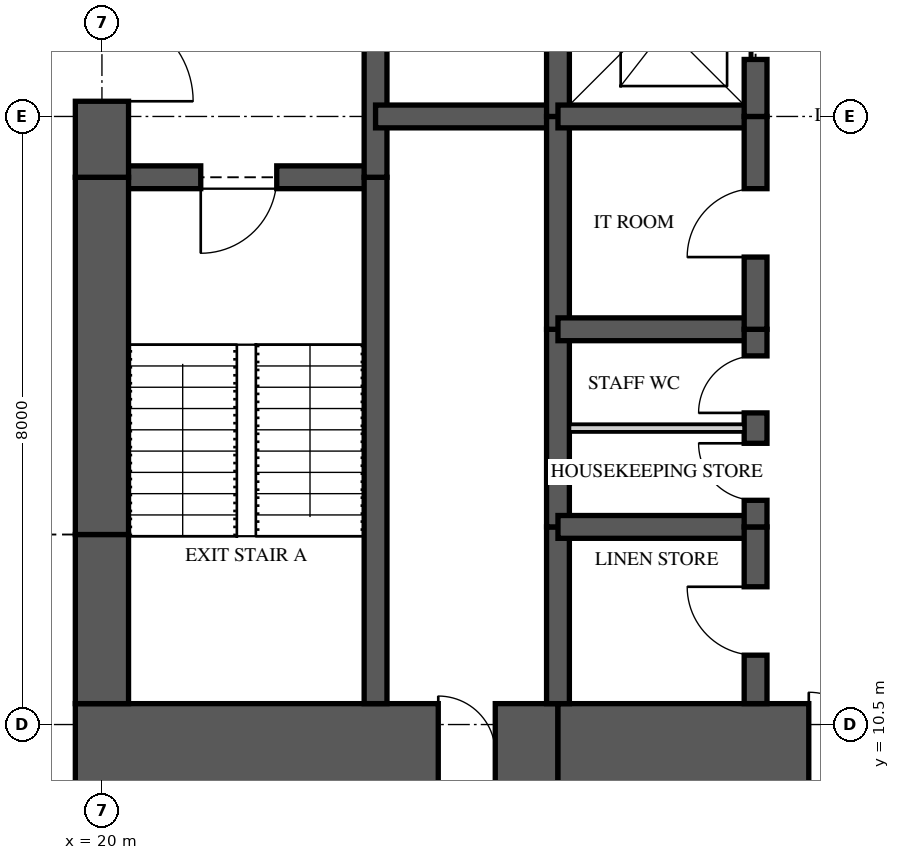
"""IFC4 building model, lengths in metres.
Left out: names, types, materials, properties, quantities, classifications, styles, units other than length and angle.
Written with IfcOpenShell. Run it as: python <this file> out.ifc"""

import sys

from ifc_helpers import new_model, si_unit, direction, frame, frame_2d, origin, place, context, subcontext, project, spatial, rectangle, extrude, element, fill, save


model = new_model("IFC4")
c1 = context("Model", 3, precision=1e-05, world=origin(), true_north=direction((0.0, 1.0)))
c2 = subcontext(c1, "Body", "Model", "MODEL_VIEW")
j1 = project(units=[si_unit("LENGTHUNIT", "METRE"), si_unit("PLANEANGLEUNIT", "RADIAN")], contexts=[c1])
p1 = place(None, origin())
s1 = spatial("IfcSite", under=j1, at=p1, CompositionType="ELEMENT")
p2 = place(p1, origin())
s2 = spatial("IfcBuilding", under=s1, at=p2, CompositionType="ELEMENT")
p3 = place(p2, frame((0.0, 0.0, 201.25)))
s3 = spatial("IfcBuildingStorey", under=s2, at=p3, CompositionType="ELEMENT", Elevation=201.25)
p4 = place(p3, frame((19.65, 10.125, 0.0), z_axis=(0.0, 0.0, 1.0), x_axis=(1.0, 0.0, 0.0)))
e1 = element("IfcWall", 1, at=p4, inside=s3, PredefinedType="SHEAR", context=c2, shape_type="SweptSolid", body=[
    extrude(rectangle(XDim=6.35, YDim=1.3, at=frame_2d((3.175, 0.0))), origin(), (0.0, 0.0, 1.0), 3.35),
])
p5 = place(p4, frame((4.775, 0.0, 0.0)))
e2 = element("IfcOpeningElement", 2, at=p5, cuts=e1, PredefinedType="OPENING", context=c2, shape_type="SweptSolid", body=[
    extrude(rectangle(XDim=0.75, YDim=2.1, at=frame_2d((0.375, 1.05))), frame((0.0, 0.66, 0.0), z_axis=(0.0, -1.0, 0.0), x_axis=(1.0, 0.0, 0.0)), (0.0, 0.0, 1.0), 1.32),
])
p6 = place(p3, frame((26.0, 10.125, 0.0), z_axis=(0.0, 0.0, 1.0), x_axis=(1.0, 0.0, 0.0)))
e3 = element("IfcWall", 3, at=p6, inside=s3, PredefinedType="SHEAR", context=c2, shape_type="SweptSolid", body=[
    extrude(rectangle(XDim=5.6, YDim=1.3, at=frame_2d((2.8, 0.0))), origin(), (0.0, 0.0, 1.0), 3.35),
])
p7 = place(p6, frame((3.3, 0.0, 0.0)))
e4 = element("IfcOpeningElement", 4, at=p7, cuts=e3, PredefinedType="OPENING", context=c2, shape_type="SweptSolid", body=[
    extrude(rectangle(XDim=1.6, YDim=2.1, at=frame_2d((0.8, 1.05))), frame((0.0, 0.66, 0.0), z_axis=(0.0, -1.0, 0.0), x_axis=(1.0, 0.0, 0.0)), (0.0, 0.0, 1.0), 1.32),
])
p8 = place(p3, frame((20.0, 23.3, 0.0), z_axis=(0.0, 0.0, 1.0), x_axis=(0.0, -1.0, 0.0)))
e5 = element("IfcWall", 5, at=p8, inside=s3, PredefinedType="SHEAR", context=c2, shape_type="SweptSolid", body=[
    extrude(rectangle(XDim=5.6, YDim=0.7, at=frame_2d((2.8, 0.0))), origin(), (0.0, 0.0, 1.0), 3.35),
])
p9 = place(p8, frame((3.4, 0.0, 0.0)))
e6 = element("IfcOpeningElement", 6, at=p9, cuts=e5, PredefinedType="OPENING", context=c2, shape_type="SweptSolid", body=[
    extrude(rectangle(XDim=1.2, YDim=2.2, at=frame_2d((0.6, 1.1))), frame((0.0, 0.36, 0.0), z_axis=(0.0, -1.0, 0.0), x_axis=(1.0, 0.0, 0.0)), (0.0, 0.0, 1.0), 0.72),
])
p10 = place(p3, frame((20.0, 17.7, 0.0), z_axis=(0.0, 0.0, 1.0), x_axis=(0.0, -1.0, 0.0)))
e7 = element("IfcWall", 7, at=p10, inside=s3, PredefinedType="SHEAR", context=c2, shape_type="SweptSolid", body=[
    extrude(rectangle(XDim=4.7, YDim=0.7, at=frame_2d((2.35, 0.0))), origin(), (0.0, 0.0, 1.0), 3.35),
])
p11 = place(p3, frame((20.0, 13.0, 0.0), z_axis=(0.0, 0.0, 1.0), x_axis=(0.0, -1.0, 0.0)))
e8 = element("IfcWall", 8, at=p11, inside=s3, PredefinedType="SHEAR", context=c2, shape_type="SweptSolid", body=[
    extrude(rectangle(XDim=2.225, YDim=0.7, at=frame_2d((1.113, 0.0))), origin(), (0.0, 0.0, 1.0), 3.35),
])
p12 = place(p3, frame((23.6, 10.775, 0.0), z_axis=(0.0, 0.0, 1.0), x_axis=(0.0, 1.0, 0.0)))
e9 = element("IfcWall", 9, at=p12, inside=s3, PredefinedType="SHEAR", context=c2, shape_type="SweptSolid", body=[
    extrude(rectangle(XDim=6.925, YDim=0.3, at=frame_2d((3.462, 0.0))), origin(), (0.0, 0.0, 1.0), 3.35),
])
p13 = place(p3, frame((23.6, 17.7, 0.0), z_axis=(0.0, 0.0, 1.0), x_axis=(0.0, 1.0, 0.0)))
e10 = element("IfcWall", 10, at=p13, inside=s3, PredefinedType="SHEAR", context=c2, shape_type="SweptSolid", body=[
    extrude(rectangle(XDim=5.6, YDim=0.3, at=frame_2d((2.8, 0.0))), origin(), (0.0, 0.0, 1.0), 3.35),
])
p14 = place(p3, frame((26.0, 10.775, 0.0), z_axis=(0.0, 0.0, 1.0), x_axis=(0.0, 1.0, 0.0)))
e11 = element("IfcWall", 11, at=p14, inside=s3, PredefinedType="SHEAR", context=c2, shape_type="SweptSolid", body=[
    extrude(rectangle(XDim=2.325, YDim=0.3, at=frame_2d((1.163, 0.0))), origin(), (0.0, 0.0, 1.0), 3.35),
])
p15 = place(p3, frame((26.0, 13.1, 0.0), z_axis=(0.0, 0.0, 1.0), x_axis=(0.0, 1.0, 0.0)))
e12 = element("IfcWall", 12, at=p15, inside=s3, PredefinedType="SHEAR", context=c2, shape_type="SweptSolid", body=[
    extrude(rectangle(XDim=2.6, YDim=0.3, at=frame_2d((1.3, 0.0))), origin(), (0.0, 0.0, 1.0), 3.35),
])
p16 = place(p3, frame((26.0, 15.7, 0.0), z_axis=(0.0, 0.0, 1.0), x_axis=(0.0, 1.0, 0.0)))
e13 = element("IfcWall", 13, at=p16, inside=s3, PredefinedType="SHEAR", context=c2, shape_type="SweptSolid", body=[
    extrude(rectangle(XDim=2.8, YDim=0.3, at=frame_2d((1.4, 0.0))), origin(), (0.0, 0.0, 1.0), 3.35),
])
p17 = place(p3, frame((26.0, 18.5, 0.0), z_axis=(0.0, 0.0, 1.0), x_axis=(0.0, 1.0, 0.0)))
e14 = element("IfcWall", 14, at=p17, inside=s3, PredefinedType="SHEAR", context=c2, shape_type="SweptSolid", body=[
    extrude(rectangle(XDim=2.6, YDim=0.3, at=frame_2d((1.3, 0.0))), origin(), (0.0, 0.0, 1.0), 3.35),
])
p18 = place(p3, frame((28.6, 10.775, 0.0), z_axis=(0.0, 0.0, 1.0), x_axis=(0.0, 1.0, 0.0)))
e15 = element("IfcWall", 15, at=p18, inside=s3, PredefinedType="SHEAR", context=c2, shape_type="SweptSolid", body=[
    extrude(rectangle(XDim=2.325, YDim=0.3, at=frame_2d((1.163, 0.0))), origin(), (0.0, 0.0, 1.0), 3.35),
])
p19 = place(p18, frame((0.637, 0.0, 0.0)))
e16 = element("IfcOpeningElement", 16, at=p19, cuts=e15, PredefinedType="OPENING", context=c2, shape_type="SweptSolid", body=[
    extrude(rectangle(XDim=0.9, YDim=2.1, at=frame_2d((0.45, 1.05))), frame((0.0, 0.16, 0.0), z_axis=(0.0, -1.0, 0.0), x_axis=(1.0, 0.0, 0.0)), (0.0, 0.0, 1.0), 0.32),
])
p20 = place(p3, frame((28.6, 13.1, 0.0), z_axis=(0.0, 0.0, 1.0), x_axis=(0.0, 1.0, 0.0)))
e17 = element("IfcWall", 17, at=p20, inside=s3, PredefinedType="SHEAR", context=c2, shape_type="SweptSolid", body=[
    extrude(rectangle(XDim=2.6, YDim=0.3, at=frame_2d((1.3, 0.0))), origin(), (0.0, 0.0, 1.0), 3.35),
])
p21 = place(p20, frame((0.35, 0.0, 0.0)))
e18 = element("IfcOpeningElement", 18, at=p21, cuts=e17, PredefinedType="OPENING", context=c2, shape_type="SweptSolid", body=[
    extrude(rectangle(XDim=0.75, YDim=2.1, at=frame_2d((0.375, 1.05))), frame((0.0, 0.16, 0.0), z_axis=(0.0, -1.0, 0.0), x_axis=(1.0, 0.0, 0.0)), (0.0, 0.0, 1.0), 0.32),
])
p22 = place(p20, frame((1.5, 0.0, 0.0)))
e19 = element("IfcOpeningElement", 19, at=p22, cuts=e17, PredefinedType="OPENING", context=c2, shape_type="SweptSolid", body=[
    extrude(rectangle(XDim=0.75, YDim=2.1, at=frame_2d((0.375, 1.05))), frame((0.0, 0.16, 0.0), z_axis=(0.0, -1.0, 0.0), x_axis=(1.0, 0.0, 0.0)), (0.0, 0.0, 1.0), 0.32),
])
p23 = place(p3, frame((28.6, 15.7, 0.0), z_axis=(0.0, 0.0, 1.0), x_axis=(0.0, 1.0, 0.0)))
e20 = element("IfcWall", 20, at=p23, inside=s3, PredefinedType="SHEAR", context=c2, shape_type="SweptSolid", body=[
    extrude(rectangle(XDim=2.8, YDim=0.3, at=frame_2d((1.4, 0.0))), origin(), (0.0, 0.0, 1.0), 3.35),
])
p24 = place(p23, frame((0.95, 0.0, 0.0)))
e21 = element("IfcOpeningElement", 21, at=p24, cuts=e20, PredefinedType="OPENING", context=c2, shape_type="SweptSolid", body=[
    extrude(rectangle(XDim=0.9, YDim=2.1, at=frame_2d((0.45, 1.05))), frame((0.0, 0.16, 0.0), z_axis=(0.0, -1.0, 0.0), x_axis=(1.0, 0.0, 0.0)), (0.0, 0.0, 1.0), 0.32),
])
p25 = place(p3, frame((28.6, 18.5, 0.0), z_axis=(0.0, 0.0, 1.0), x_axis=(0.0, 1.0, 0.0)))
e22 = element("IfcWall", 22, at=p25, inside=s3, PredefinedType="SHEAR", context=c2, shape_type="SweptSolid", body=[
    extrude(rectangle(XDim=2.6, YDim=0.3, at=frame_2d((1.3, 0.0))), origin(), (0.0, 0.0, 1.0), 3.35),
])
p26 = place(p25, frame((0.75, 0.0, 0.0)))
e23 = element("IfcOpeningElement", 23, at=p26, cuts=e22, PredefinedType="OPENING", context=c2, shape_type="SweptSolid", body=[
    extrude(rectangle(XDim=1.1, YDim=2.1, at=frame_2d((0.55, 1.05))), frame((0.0, 0.16, 0.0), z_axis=(0.0, -1.0, 0.0), x_axis=(1.0, 0.0, 0.0)), (0.0, 0.0, 1.0), 0.32),
])
p27 = place(p3, frame((20.0, 17.7, 0.0), z_axis=(0.0, 0.0, 1.0), x_axis=(1.0, 0.0, 0.0)))
e24 = element("IfcWall", 24, at=p27, inside=s3, PredefinedType="SHEAR", context=c2, shape_type="SweptSolid", body=[
    extrude(rectangle(XDim=3.6, YDim=0.3, at=frame_2d((1.8, 0.0))), origin(), (0.0, 0.0, 1.0), 3.35),
])
p28 = place(p27, frame((1.3, 0.0, 0.0)))
e25 = element("IfcOpeningElement", 25, at=p28, cuts=e24, PredefinedType="OPENING", context=c2, shape_type="SweptSolid", body=[
    extrude(rectangle(XDim=1.0, YDim=2.1, at=frame_2d((0.5, 1.05))), frame((0.0, 0.16, 0.0), z_axis=(0.0, -1.0, 0.0), x_axis=(1.0, 0.0, 0.0)), (0.0, 0.0, 1.0), 0.32),
])
p29 = place(p3, frame((23.6, 18.5, 0.0), z_axis=(0.0, 0.0, 1.0), x_axis=(1.0, 0.0, 0.0)))
e26 = element("IfcWall", 26, at=p29, inside=s3, PredefinedType="SHEAR", context=c2, shape_type="SweptSolid", body=[
    extrude(rectangle(XDim=2.4, YDim=0.3, at=frame_2d((1.2, 0.0))), origin(), (0.0, 0.0, 1.0), 3.35),
])
for number, where, z_axis, x_axis in (
    (27, (26.0, 13.1, 0.0), (0.0, 0.0, 1.0), (1.0, 0.0, 0.0)),
    (28, (26.0, 15.7, 0.0), (0.0, 0.0, 1.0), (1.0, 0.0, 0.0)),
    (29, (26.0, 18.5, 0.0), (0.0, 0.0, 1.0), (1.0, 0.0, 0.0)),
):
    element("IfcWall", number, at=place(p3, frame(where, z_axis=z_axis, x_axis=x_axis)), inside=s3, PredefinedType="SHEAR", context=c2, shape_type="SweptSolid", body=[
        extrude(rectangle(XDim=2.6, YDim=0.3, at=frame_2d((1.3, 0.0))), origin(), (0.0, 0.0, 1.0), 3.35),
    ])
p30 = place(p3, frame((26.15, 14.4, 0.0), z_axis=(0.0, 0.0, 1.0), x_axis=(1.0, 0.0, 0.0)))
e30 = element("IfcWall", 30, at=p30, inside=s3, PredefinedType="PARTITIONING", context=c2, shape_type="SweptSolid", body=[
    extrude(rectangle(XDim=2.3, YDim=0.1, at=frame_2d((1.15, 0.0))), origin(), (0.0, 0.0, 1.0), 3.11),
])
p31 = place(p28, frame((1.0, 0.0, 0.0), z_axis=(0.0, 0.0, 1.0), x_axis=(-1.0, 0.0, 0.0)))
e31 = element("IfcDoor", 31, at=p31, inside=s3, OperationType="SINGLE_SWING_RIGHT", PredefinedType="DOOR", context=c2, shape_type="SweptSolid", body=[
    extrude(rectangle(XDim=1.0, YDim=2.1, at=frame_2d((0.5, 1.05))), frame((0.0, 0.025, 0.0), z_axis=(0.0, -1.0, 0.0), x_axis=(1.0, 0.0, 0.0)), (0.0, 0.0, 1.0), 0.05),
])
fill(e25, e31)
p32 = place(p9, origin())
e32 = element("IfcDoor", 32, at=p32, inside=s3, OperationType="SINGLE_SWING_RIGHT", PredefinedType="DOOR", context=c2, shape_type="SweptSolid", body=[
    extrude(rectangle(XDim=1.2, YDim=2.2, at=frame_2d((0.6, 1.1))), frame((0.0, 0.025, 0.0), z_axis=(0.0, -1.0, 0.0), x_axis=(1.0, 0.0, 0.0)), (0.0, 0.0, 1.0), 0.05),
])
fill(e6, e32)
p33 = place(p26, origin())
e33 = element("IfcDoor", 33, at=p33, inside=s3, OperationType="SLIDING_TO_LEFT", PredefinedType="DOOR", context=c2, shape_type="SweptSolid", body=[
    extrude(rectangle(XDim=1.1, YDim=2.1, at=frame_2d((0.55, 1.05))), frame((0.0, 0.025, 0.0), z_axis=(0.0, -1.0, 0.0), x_axis=(1.0, 0.0, 0.0)), (0.0, 0.0, 1.0), 0.05),
])
fill(e23, e33)
p34 = place(p19, origin())
e34 = element("IfcDoor", 34, at=p34, inside=s3, OperationType="SINGLE_SWING_RIGHT", PredefinedType="DOOR", context=c2, shape_type="SweptSolid", body=[
    extrude(rectangle(XDim=0.9, YDim=2.1, at=frame_2d((0.45, 1.05))), frame((0.0, 0.025, 0.0), z_axis=(0.0, -1.0, 0.0), x_axis=(1.0, 0.0, 0.0)), (0.0, 0.0, 1.0), 0.05),
])
fill(e16, e34)
p35 = place(p21, origin())
e35 = element("IfcDoor", 35, at=p35, inside=s3, OperationType="SINGLE_SWING_RIGHT", PredefinedType="DOOR", context=c2, shape_type="SweptSolid", body=[
    extrude(rectangle(XDim=0.75, YDim=2.1, at=frame_2d((0.375, 1.05))), frame((0.0, 0.025, 0.0), z_axis=(0.0, -1.0, 0.0), x_axis=(1.0, 0.0, 0.0)), (0.0, 0.0, 1.0), 0.05),
])
fill(e18, e35)
p36 = place(p22, origin())
e36 = element("IfcDoor", 36, at=p36, inside=s3, OperationType="SINGLE_SWING_LEFT", PredefinedType="DOOR", context=c2, shape_type="SweptSolid", body=[
    extrude(rectangle(XDim=0.75, YDim=2.1, at=frame_2d((0.375, 1.05))), frame((0.0, 0.025, 0.0), z_axis=(0.0, -1.0, 0.0), x_axis=(1.0, 0.0, 0.0)), (0.0, 0.0, 1.0), 0.05),
])
fill(e19, e36)
p37 = place(p24, origin())
e37 = element("IfcDoor", 37, at=p37, inside=s3, OperationType="SINGLE_SWING_LEFT", PredefinedType="DOOR", context=c2, shape_type="SweptSolid", body=[
    extrude(rectangle(XDim=0.9, YDim=2.1, at=frame_2d((0.45, 1.05))), frame((0.0, 0.025, 0.0), z_axis=(0.0, -1.0, 0.0), x_axis=(1.0, 0.0, 0.0)), (0.0, 0.0, 1.0), 0.05),
])
fill(e21, e37)
p38 = place(p7, origin())
e38 = element("IfcDoor", 38, at=p38, inside=s3, OperationType="DOUBLE_DOOR_SINGLE_SWING", PredefinedType="DOOR", context=c2, shape_type="SweptSolid", body=[
    extrude(rectangle(XDim=1.6, YDim=2.1, at=frame_2d((0.8, 1.05))), frame((0.0, 0.025, 0.0), z_axis=(0.0, -1.0, 0.0), x_axis=(1.0, 0.0, 0.0)), (0.0, 0.0, 1.0), 0.05),
])
fill(e4, e38)
p39 = place(p5, origin())
e39 = element("IfcDoor", 39, at=p39, inside=s3, OperationType="SINGLE_SWING_LEFT", PredefinedType="DOOR", context=c2, shape_type="SweptSolid", body=[
    extrude(rectangle(XDim=0.75, YDim=2.1, at=frame_2d((0.375, 1.05))), frame((0.0, 0.025, 0.0), z_axis=(0.0, -1.0, 0.0), x_axis=(1.0, 0.0, 0.0)), (0.0, 0.0, 1.0), 0.05),
])
fill(e2, e39)
save(model, sys.argv[1])
